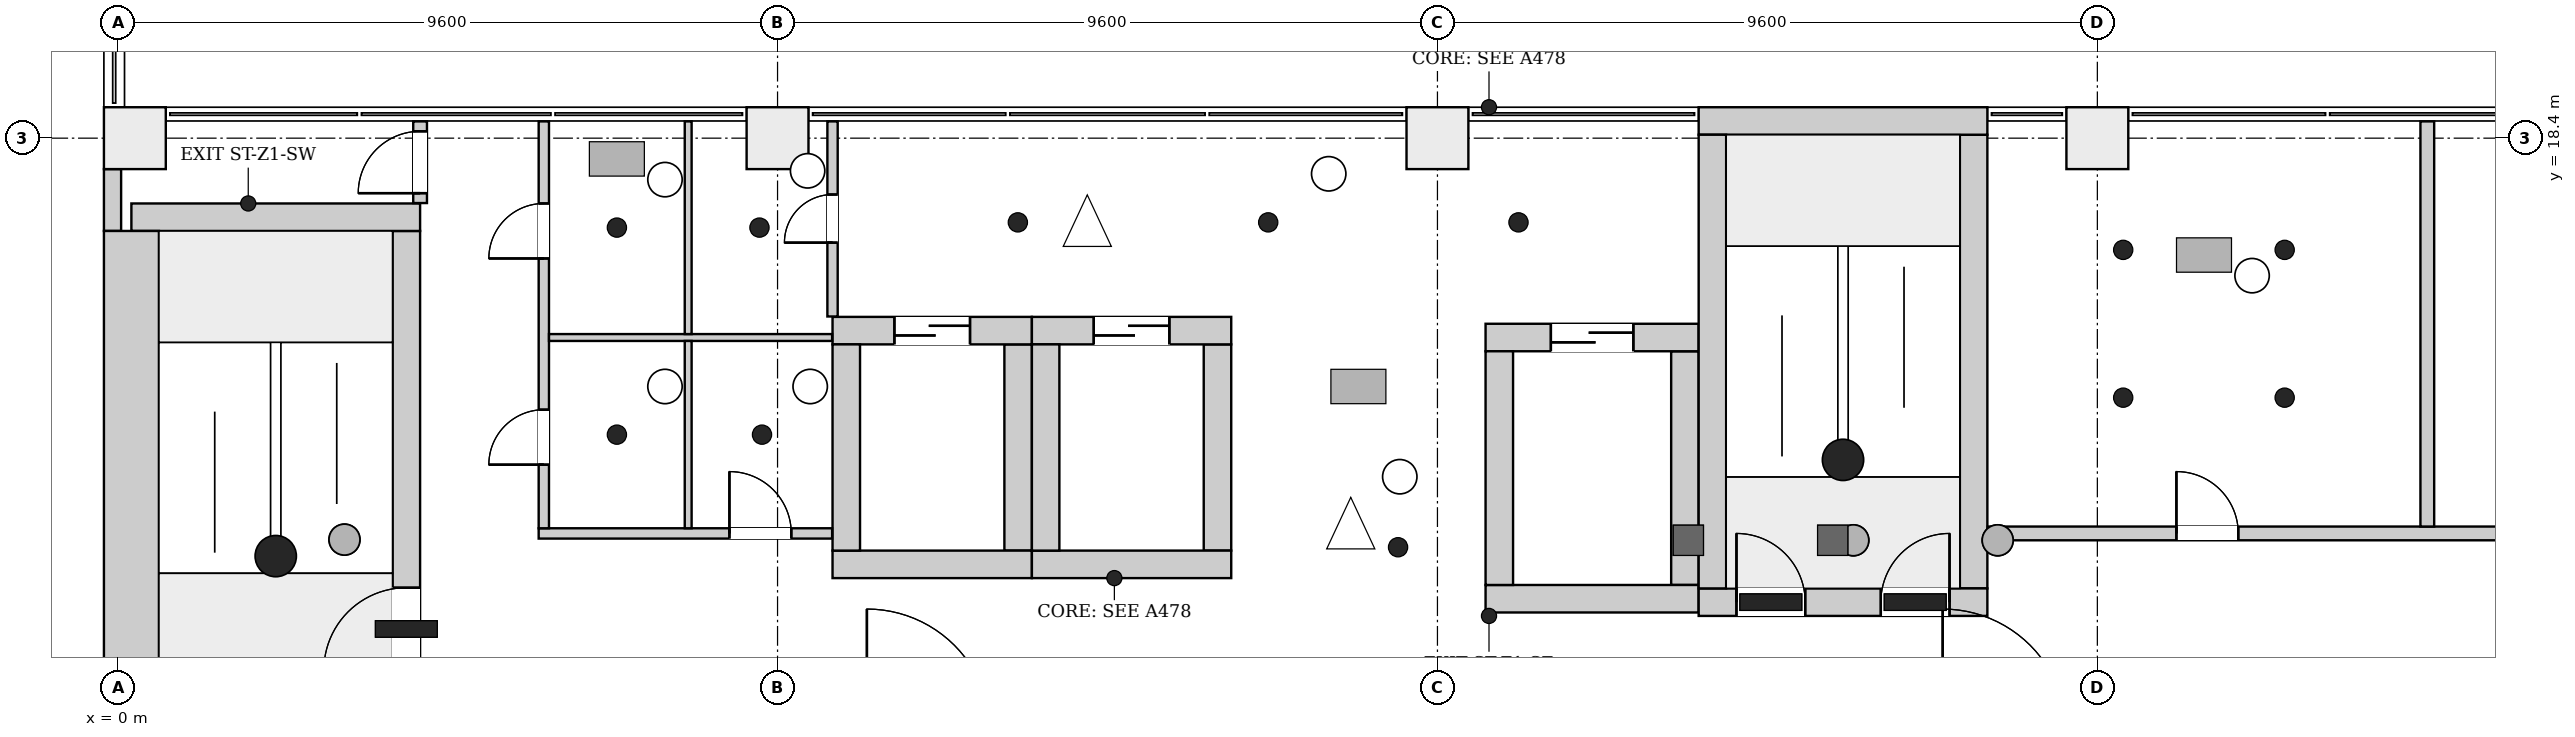
"""IFC4 building model, lengths in metres.
Left out: names, types, materials, properties, quantities, classifications, styles, units other than length and angle.
Written with IfcOpenShell. Run it as: python <this file> out.ifc"""

import sys

from ifc_helpers import new_model, si_unit, direction, frame, frame_2d, origin, origin_2d, place, context, subcontext, project, spatial, rectangle, extrude, element, fill, save


model = new_model("IFC4")
c1 = context("Model", 3, precision=1e-05, world=origin(), true_north=direction((0.0, 1.0)))
c2 = subcontext(c1, "Body", "Model", "MODEL_VIEW")
j1 = project(units=[si_unit("LENGTHUNIT", "METRE"), si_unit("PLANEANGLEUNIT", "RADIAN")], contexts=[c1])
p1 = place(None, origin())
s1 = spatial("IfcSite", under=j1, at=p1, CompositionType="ELEMENT")
p2 = place(p1, origin())
s2 = spatial("IfcBuilding", under=s1, at=p2, CompositionType="ELEMENT")
p3 = place(p2, frame((0.0, 0.0, 57.1)))
s3 = spatial("IfcBuildingStorey", under=s2, at=p3, CompositionType="ELEMENT", Elevation=57.1)
p4 = place(p3, frame((0.2, 17.25, 0.0), z_axis=(0.0, 0.0, 1.0), x_axis=(1.0, 0.0, 0.0)))
e1 = element("IfcWall", 1, at=p4, inside=s3, PredefinedType="SHEAR", context=c2, shape_type="SweptSolid", body=[
    extrude(rectangle(XDim=4.2, YDim=0.4, at=frame_2d((2.1, 0.0))), origin(), (0.0, 0.0, 1.0), 4.2),
])
p5 = place(p3, frame((0.2, 10.45, 0.0), z_axis=(0.0, 0.0, 1.0), x_axis=(0.0, 1.0, 0.0)))
e2 = element("IfcWall", 2, at=p5, inside=s3, PredefinedType="SHEAR", context=c2, shape_type="SweptSolid", body=[
    extrude(rectangle(XDim=6.6, YDim=0.8, at=frame_2d((3.3, 0.0))), origin(), (0.0, 0.0, 1.0), 4.2),
])
p6 = place(p3, frame((4.2, 10.45, 0.0), z_axis=(0.0, 0.0, 1.0), x_axis=(0.0, 1.0, 0.0)))
e3 = element("IfcWall", 3, at=p6, inside=s3, PredefinedType="SHEAR", context=c2, shape_type="SweptSolid", body=[
    extrude(rectangle(XDim=6.6, YDim=0.4, at=frame_2d((3.3, 0.0))), origin(), (0.0, 0.0, 1.0), 4.2),
])
p7 = place(p6, frame((0.21, 0.0, 0.0)))
e4 = element("IfcOpeningElement", 4, at=p7, cuts=e3, PredefinedType="OPENING", context=c2, shape_type="SweptSolid", body=[
    extrude(rectangle(XDim=1.2, YDim=2.1, at=frame_2d((0.6, 1.05))), frame((0.0, 0.21, 0.0), z_axis=(0.0, -1.0, 0.0), x_axis=(1.0, 0.0, 0.0)), (0.0, 0.0, 1.0), 0.42),
])
p8 = place(p3, frame((23.0, 11.65, 0.0), z_axis=(0.0, 0.0, 1.0), x_axis=(1.0, 0.0, 0.0)))
e5 = element("IfcWall", 5, at=p8, inside=s3, PredefinedType="SHEAR", context=c2, shape_type="SweptSolid", body=[
    extrude(rectangle(XDim=4.2, YDim=0.4, at=frame_2d((2.1, 0.0))), origin(), (0.0, 0.0, 1.0), 4.2),
])
p9 = place(p8, frame((0.55, 0.0, 0.0)))
e6 = element("IfcOpeningElement", 6, at=p9, cuts=e5, PredefinedType="OPENING", context=c2, shape_type="SweptSolid", body=[
    extrude(rectangle(XDim=1.0, YDim=2.1, at=frame_2d((0.5, 1.05))), frame((0.0, 0.21, 0.0), z_axis=(0.0, -1.0, 0.0), x_axis=(1.0, 0.0, 0.0)), (0.0, 0.0, 1.0), 0.42),
])
p10 = place(p8, frame((2.65, 0.0, 0.0)))
e7 = element("IfcOpeningElement", 7, at=p10, cuts=e5, PredefinedType="OPENING", context=c2, shape_type="SweptSolid", body=[
    extrude(rectangle(XDim=1.0, YDim=2.1, at=frame_2d((0.5, 1.05))), frame((0.0, 0.21, 0.0), z_axis=(0.0, -1.0, 0.0), x_axis=(1.0, 0.0, 0.0)), (0.0, 0.0, 1.0), 0.42),
])
p11 = place(p3, frame((23.0, 18.65, 0.0), z_axis=(0.0, 0.0, 1.0), x_axis=(1.0, 0.0, 0.0)))
e8 = element("IfcWall", 8, at=p11, inside=s3, PredefinedType="SHEAR", context=c2, shape_type="SweptSolid", body=[
    extrude(rectangle(XDim=4.2, YDim=0.4, at=frame_2d((2.1, 0.0))), origin(), (0.0, 0.0, 1.0), 4.2),
])
for number, where, z_axis, x_axis in (
    (9, (23.2, 11.85, 0.0), (0.0, 0.0, 1.0), (0.0, 1.0, 0.0)),
    (10, (27.0, 11.85, 0.0), (0.0, 0.0, 1.0), (0.0, 1.0, 0.0)),
):
    element("IfcWall", number, at=place(p3, frame(where, z_axis=z_axis, x_axis=x_axis)), inside=s3, PredefinedType="SHEAR", context=c2, shape_type="SweptSolid", body=[
        extrude(rectangle(XDim=6.6, YDim=0.4, at=frame_2d((3.3, 0.0))), origin(), (0.0, 0.0, 1.0), 4.2),
    ])
p12 = place(p3, frame((10.4, 12.2, 0.0), z_axis=(0.0, 0.0, 1.0), x_axis=(1.0, 0.0, 0.0)))
e11 = element("IfcWall", 11, at=p12, inside=s3, PredefinedType="SHEAR", context=c2, shape_type="SweptSolid", body=[
    extrude(rectangle(XDim=2.9, YDim=0.4, at=frame_2d((1.45, 0.0))), origin(), (0.0, 0.0, 1.0), 4.2),
])
p13 = place(p3, frame((10.4, 15.6, 0.0), z_axis=(0.0, 0.0, 1.0), x_axis=(1.0, 0.0, 0.0)))
e12 = element("IfcWall", 12, at=p13, inside=s3, PredefinedType="SHEAR", context=c2, shape_type="SweptSolid", body=[
    extrude(rectangle(XDim=2.9, YDim=0.4, at=frame_2d((1.45, 0.0))), origin(), (0.0, 0.0, 1.0), 4.2),
])
p14 = place(p13, frame((0.9, 0.0, 0.0)))
e13 = element("IfcOpeningElement", 13, at=p14, cuts=e12, PredefinedType="OPENING", context=c2, shape_type="SweptSolid", body=[
    extrude(rectangle(XDim=1.1, YDim=2.1, at=frame_2d((0.55, 1.05))), frame((0.0, 0.21, 0.0), z_axis=(0.0, -1.0, 0.0), x_axis=(1.0, 0.0, 0.0)), (0.0, 0.0, 1.0), 0.42),
])
for number, where, z_axis, x_axis in (
    (14, (10.6, 12.4, 0.0), (0.0, 0.0, 1.0), (0.0, 1.0, 0.0)),
    (15, (13.1, 12.4, 0.0), (0.0, 0.0, 1.0), (0.0, 1.0, 0.0)),
):
    element("IfcWall", number, at=place(p3, frame(where, z_axis=z_axis, x_axis=x_axis)), inside=s3, PredefinedType="SHEAR", context=c2, shape_type="SweptSolid", body=[
        extrude(rectangle(XDim=3.0, YDim=0.4, at=frame_2d((1.5, 0.0))), origin(), (0.0, 0.0, 1.0), 4.2),
    ])
p15 = place(p3, frame((13.3, 12.2, 0.0), z_axis=(0.0, 0.0, 1.0), x_axis=(1.0, 0.0, 0.0)))
e16 = element("IfcWall", 16, at=p15, inside=s3, PredefinedType="SHEAR", context=c2, shape_type="SweptSolid", body=[
    extrude(rectangle(XDim=2.9, YDim=0.4, at=frame_2d((1.45, 0.0))), origin(), (0.0, 0.0, 1.0), 4.2),
])
p16 = place(p3, frame((13.3, 15.6, 0.0), z_axis=(0.0, 0.0, 1.0), x_axis=(1.0, 0.0, 0.0)))
e17 = element("IfcWall", 17, at=p16, inside=s3, PredefinedType="SHEAR", context=c2, shape_type="SweptSolid", body=[
    extrude(rectangle(XDim=2.9, YDim=0.4, at=frame_2d((1.45, 0.0))), origin(), (0.0, 0.0, 1.0), 4.2),
])
p17 = place(p16, frame((0.9, 0.0, 0.0)))
e18 = element("IfcOpeningElement", 18, at=p17, cuts=e17, PredefinedType="OPENING", context=c2, shape_type="SweptSolid", body=[
    extrude(rectangle(XDim=1.1, YDim=2.1, at=frame_2d((0.55, 1.05))), frame((0.0, 0.21, 0.0), z_axis=(0.0, -1.0, 0.0), x_axis=(1.0, 0.0, 0.0)), (0.0, 0.0, 1.0), 0.42),
])
for number, where, z_axis, x_axis in (
    (19, (13.5, 12.4, 0.0), (0.0, 0.0, 1.0), (0.0, 1.0, 0.0)),
    (20, (16.0, 12.4, 0.0), (0.0, 0.0, 1.0), (0.0, 1.0, 0.0)),
):
    element("IfcWall", number, at=place(p3, frame(where, z_axis=z_axis, x_axis=x_axis)), inside=s3, PredefinedType="SHEAR", context=c2, shape_type="SweptSolid", body=[
        extrude(rectangle(XDim=3.0, YDim=0.4, at=frame_2d((1.5, 0.0))), origin(), (0.0, 0.0, 1.0), 4.2),
    ])
p18 = place(p3, frame((19.9, 11.7, 0.0), z_axis=(0.0, 0.0, 1.0), x_axis=(1.0, 0.0, 0.0)))
e21 = element("IfcWall", 21, at=p18, inside=s3, PredefinedType="SHEAR", context=c2, shape_type="SweptSolid", body=[
    extrude(rectangle(XDim=3.1, YDim=0.4, at=frame_2d((1.55, 0.0))), origin(), (0.0, 0.0, 1.0), 4.2),
])
p19 = place(p3, frame((19.9, 15.5, 0.0), z_axis=(0.0, 0.0, 1.0), x_axis=(1.0, 0.0, 0.0)))
e22 = element("IfcWall", 22, at=p19, inside=s3, PredefinedType="SHEAR", context=c2, shape_type="SweptSolid", body=[
    extrude(rectangle(XDim=3.1, YDim=0.4, at=frame_2d((1.55, 0.0))), origin(), (0.0, 0.0, 1.0), 4.2),
])
p20 = place(p19, frame((0.95, 0.0, 0.0)))
e23 = element("IfcOpeningElement", 23, at=p20, cuts=e22, PredefinedType="OPENING", context=c2, shape_type="SweptSolid", body=[
    extrude(rectangle(XDim=1.2, YDim=2.1, at=frame_2d((0.6, 1.05))), frame((0.0, 0.21, 0.0), z_axis=(0.0, -1.0, 0.0), x_axis=(1.0, 0.0, 0.0)), (0.0, 0.0, 1.0), 0.42),
])
for number, where, z_axis, x_axis in (
    (24, (20.1, 11.9, 0.0), (0.0, 0.0, 1.0), (0.0, 1.0, 0.0)),
    (25, (22.8, 11.9, 0.0), (0.0, 0.0, 1.0), (0.0, 1.0, 0.0)),
):
    element("IfcWall", number, at=place(p3, frame(where, z_axis=z_axis, x_axis=x_axis)), inside=s3, PredefinedType="SHEAR", context=c2, shape_type="SweptSolid", body=[
        extrude(rectangle(XDim=3.4, YDim=0.4, at=frame_2d((1.7, 0.0))), origin(), (0.0, 0.0, 1.0), 4.2),
    ])
for number, where, z_axis, x_axis in (
    (26, (0.25, 18.4, 0.0), (0.0, 0.0, 1.0), (1.0, 0.0, 0.0)),
    (27, (9.6, 18.4, 0.0), (0.0, 0.0, 1.0), (1.0, 0.0, 0.0)),
    (28, (19.2, 18.4, 0.0), (0.0, 0.0, 1.0), (1.0, 0.0, 0.0)),
    (29, (28.8, 18.4, 0.0), (0.0, 0.0, 1.0), (1.0, 0.0, 0.0)),
):
    element("IfcColumn", number, at=place(p3, frame(where, z_axis=z_axis, x_axis=x_axis)), inside=s3, PredefinedType="COLUMN", context=c2, shape_type="SweptSolid", body=[
        extrude(rectangle(XDim=0.9, YDim=0.9, at=origin_2d()), origin(), (0.0, 0.0, 1.0), 4.2),
    ])
p21 = place(p3, frame((-0.074, 17.95, 0.0), z_axis=(0.0, 0.0, 1.0), x_axis=(0.0, -1.0, 0.0)))
e30 = element("IfcWall", 30, at=p21, inside=s3, PredefinedType="ELEMENTEDWALL", context=c2, shape_type="SweptSolid", body=[
    extrude(rectangle(XDim=0.9, YDim=0.25, at=frame_2d((0.45, 0.0))), origin(), (0.0, 0.0, 1.0), 3.9),
])
p22 = place(p3, frame((4.4, 17.456, 0.0), z_axis=(0.0, 0.0, 1.0), x_axis=(0.0, 1.0, 0.0)))
e31 = element("IfcWall", 31, at=p22, inside=s3, PredefinedType="PARTITIONING", context=c2, shape_type="SweptSolid", body=[
    extrude(rectangle(XDim=1.188, YDim=0.2, at=frame_2d((0.594, 0.0))), origin(), (0.0, 0.0, 1.0), 3.9),
])
p23 = place(p22, frame((0.144, 0.0, 0.0)))
e32 = element("IfcOpeningElement", 32, at=p23, cuts=e31, PredefinedType="OPENING", context=c2, shape_type="SweptSolid", body=[
    extrude(rectangle(XDim=0.9, YDim=2.1, at=frame_2d((0.45, 1.05))), frame((0.0, 0.11, 0.0), z_axis=(0.0, -1.0, 0.0), x_axis=(1.0, 0.0, 0.0)), (0.0, 0.0, 1.0), 0.22),
])
p24 = place(p3, frame((6.125, 12.65, 0.0), z_axis=(0.0, 0.0, 1.0), x_axis=(1.0, 0.0, 0.0)))
e33 = element("IfcWall", 33, at=p24, inside=s3, PredefinedType="PARTITIONING", context=c2, shape_type="SweptSolid", body=[
    extrude(rectangle(XDim=4.269, YDim=0.15, at=frame_2d((2.135, 0.0))), origin(), (0.0, 0.0, 1.0), 3.9),
])
p25 = place(p24, frame((2.775, 0.0, 0.0)))
e34 = element("IfcOpeningElement", 34, at=p25, cuts=e33, PredefinedType="OPENING", context=c2, shape_type="SweptSolid", body=[
    extrude(rectangle(XDim=0.9, YDim=2.1, at=frame_2d((0.45, 1.05))), frame((0.0, 0.085, 0.0), z_axis=(0.0, -1.0, 0.0), x_axis=(1.0, 0.0, 0.0)), (0.0, 0.0, 1.0), 0.17),
])
p26 = place(p3, frame((6.2, 12.725, 0.0), z_axis=(0.0, 0.0, 1.0), x_axis=(0.0, 1.0, 0.0)))
e35 = element("IfcWall", 35, at=p26, inside=s3, PredefinedType="PARTITIONING", context=c2, shape_type="SweptSolid", body=[
    extrude(rectangle(XDim=5.919, YDim=0.15, at=frame_2d((2.959, 0.0))), origin(), (0.0, 0.0, 1.0), 3.9),
])
p27 = place(p26, frame((0.925, 0.0, 0.0)))
e36 = element("IfcOpeningElement", 36, at=p27, cuts=e35, PredefinedType="OPENING", context=c2, shape_type="SweptSolid", body=[
    extrude(rectangle(XDim=0.8, YDim=2.1, at=frame_2d((0.4, 1.05))), frame((0.0, 0.085, 0.0), z_axis=(0.0, -1.0, 0.0), x_axis=(1.0, 0.0, 0.0)), (0.0, 0.0, 1.0), 0.17),
])
p28 = place(p26, frame((3.925, 0.0, 0.0)))
e37 = element("IfcOpeningElement", 37, at=p28, cuts=e35, PredefinedType="OPENING", context=c2, shape_type="SweptSolid", body=[
    extrude(rectangle(XDim=0.8, YDim=2.1, at=frame_2d((0.4, 1.05))), frame((0.0, 0.085, 0.0), z_axis=(0.0, -1.0, 0.0), x_axis=(1.0, 0.0, 0.0)), (0.0, 0.0, 1.0), 0.17),
])
p29 = place(p3, frame((6.275, 15.5, 0.0), z_axis=(0.0, 0.0, 1.0), x_axis=(1.0, 0.0, 0.0)))
e38 = element("IfcWall", 38, at=p29, inside=s3, PredefinedType="PARTITIONING", context=c2, shape_type="SweptSolid", body=[
    extrude(rectangle(XDim=4.119, YDim=0.1, at=frame_2d((2.06, 0.0))), origin(), (0.0, 0.0, 1.0), 3.9),
])
p30 = place(p3, frame((8.3, 12.725, 0.0), z_axis=(0.0, 0.0, 1.0), x_axis=(0.0, 1.0, 0.0)))
e39 = element("IfcWall", 39, at=p30, inside=s3, PredefinedType="PARTITIONING", context=c2, shape_type="SweptSolid", body=[
    extrude(rectangle(XDim=2.725, YDim=0.1, at=frame_2d((1.362, 0.0))), origin(), (0.0, 0.0, 1.0), 3.9),
])
p31 = place(p3, frame((8.3, 15.55, 0.0), z_axis=(0.0, 0.0, 1.0), x_axis=(0.0, 1.0, 0.0)))
e40 = element("IfcWall", 40, at=p31, inside=s3, PredefinedType="PARTITIONING", context=c2, shape_type="SweptSolid", body=[
    extrude(rectangle(XDim=3.094, YDim=0.1, at=frame_2d((1.547, 0.0))), origin(), (0.0, 0.0, 1.0), 3.9),
])
p32 = place(p3, frame((10.4, 15.806, 0.0), z_axis=(0.0, 0.0, 1.0), x_axis=(0.0, 1.0, 0.0)))
e41 = element("IfcWall", 41, at=p32, inside=s3, PredefinedType="PARTITIONING", context=c2, shape_type="SweptSolid", body=[
    extrude(rectangle(XDim=2.838, YDim=0.15, at=frame_2d((1.419, 0.0))), origin(), (0.0, 0.0, 1.0), 3.9),
])
p33 = place(p32, frame((1.074, 0.0, 0.0)))
e42 = element("IfcOpeningElement", 42, at=p33, cuts=e41, PredefinedType="OPENING", context=c2, shape_type="SweptSolid", body=[
    extrude(rectangle(XDim=0.7, YDim=2.1, at=frame_2d((0.35, 1.05))), frame((0.0, 0.085, 0.0), z_axis=(0.0, -1.0, 0.0), x_axis=(1.0, 0.0, 0.0)), (0.0, 0.0, 1.0), 0.17),
])
p34 = place(p3, frame((27.206, 12.65, 0.0), z_axis=(0.0, 0.0, 1.0), x_axis=(1.0, 0.0, 0.0)))
e43 = element("IfcWall", 43, at=p34, inside=s3, PredefinedType="PARTITIONING", context=c2, shape_type="SweptSolid", body=[
    extrude(rectangle(XDim=20.988, YDim=0.2, at=frame_2d((10.494, 0.0))), origin(), (0.0, 0.0, 1.0), 3.9),
])
p35 = place(p34, frame((2.744, 0.0, 0.0)))
e44 = element("IfcOpeningElement", 44, at=p35, cuts=e43, PredefinedType="OPENING", context=c2, shape_type="SweptSolid", body=[
    extrude(rectangle(XDim=0.9, YDim=2.1, at=frame_2d((0.45, 1.05))), frame((0.0, 0.11, 0.0), z_axis=(0.0, -1.0, 0.0), x_axis=(1.0, 0.0, 0.0)), (0.0, 0.0, 1.0), 0.22),
])
p36 = place(p34, frame((13.094, 0.0, 0.0)))
e45 = element("IfcOpeningElement", 45, at=p36, cuts=e43, PredefinedType="OPENING", context=c2, shape_type="SweptSolid", body=[
    extrude(rectangle(XDim=1.2, YDim=2.1, at=frame_2d((0.6, 1.05))), frame((0.0, 0.11, 0.0), z_axis=(0.0, -1.0, 0.0), x_axis=(1.0, 0.0, 0.0)), (0.0, 0.0, 1.0), 0.22),
])
p37 = place(p3, frame((33.6, 12.75, 0.0), z_axis=(0.0, 0.0, 1.0), x_axis=(0.0, 1.0, 0.0)))
e46 = element("IfcWall", 46, at=p37, inside=s3, PredefinedType="PARTITIONING", context=c2, shape_type="SweptSolid", body=[
    extrude(rectangle(XDim=5.894, YDim=0.2, at=frame_2d((2.947, 0.0))), origin(), (0.0, 0.0, 1.0), 3.9),
])
p38 = place(p7, origin())
e47 = element("IfcDoor", 47, at=p38, inside=s3, OperationType="SINGLE_SWING_RIGHT", PredefinedType="DOOR", context=c2, shape_type="SweptSolid", body=[
    extrude(rectangle(XDim=1.2, YDim=2.1, at=frame_2d((0.6, 1.05))), frame((0.0, 0.025, 0.0), z_axis=(0.0, -1.0, 0.0), x_axis=(1.0, 0.0, 0.0)), (0.0, 0.0, 1.0), 0.05),
])
fill(e4, e47)
p39 = place(p9, origin())
e48 = element("IfcDoor", 48, at=p39, inside=s3, OperationType="SINGLE_SWING_RIGHT", PredefinedType="DOOR", context=c2, shape_type="SweptSolid", body=[
    extrude(rectangle(XDim=1.0, YDim=2.1, at=frame_2d((0.5, 1.05))), frame((0.0, 0.025, 0.0), z_axis=(0.0, -1.0, 0.0), x_axis=(1.0, 0.0, 0.0)), (0.0, 0.0, 1.0), 0.05),
])
fill(e6, e48)
p40 = place(p10, origin())
e49 = element("IfcDoor", 49, at=p40, inside=s3, OperationType="SINGLE_SWING_LEFT", PredefinedType="DOOR", context=c2, shape_type="SweptSolid", body=[
    extrude(rectangle(XDim=1.0, YDim=2.1, at=frame_2d((0.5, 1.05))), frame((0.0, 0.025, 0.0), z_axis=(0.0, -1.0, 0.0), x_axis=(1.0, 0.0, 0.0)), (0.0, 0.0, 1.0), 0.05),
])
fill(e7, e49)
p41 = place(p14, origin())
e50 = element("IfcDoor", 50, at=p41, inside=s3, OperationType="DOUBLE_DOOR_SLIDING", PredefinedType="DOOR", context=c2, shape_type="SweptSolid", body=[
    extrude(rectangle(XDim=1.1, YDim=2.1, at=frame_2d((0.55, 1.05))), frame((0.0, 0.025, 0.0), z_axis=(0.0, -1.0, 0.0), x_axis=(1.0, 0.0, 0.0)), (0.0, 0.0, 1.0), 0.05),
])
fill(e13, e50)
p42 = place(p17, origin())
e51 = element("IfcDoor", 51, at=p42, inside=s3, OperationType="DOUBLE_DOOR_SLIDING", PredefinedType="DOOR", context=c2, shape_type="SweptSolid", body=[
    extrude(rectangle(XDim=1.1, YDim=2.1, at=frame_2d((0.55, 1.05))), frame((0.0, 0.025, 0.0), z_axis=(0.0, -1.0, 0.0), x_axis=(1.0, 0.0, 0.0)), (0.0, 0.0, 1.0), 0.05),
])
fill(e18, e51)
p43 = place(p20, origin())
e52 = element("IfcDoor", 52, at=p43, inside=s3, OperationType="DOUBLE_DOOR_SLIDING", PredefinedType="DOOR", context=c2, shape_type="SweptSolid", body=[
    extrude(rectangle(XDim=1.2, YDim=2.1, at=frame_2d((0.6, 1.05))), frame((0.0, 0.025, 0.0), z_axis=(0.0, -1.0, 0.0), x_axis=(1.0, 0.0, 0.0)), (0.0, 0.0, 1.0), 0.05),
])
fill(e23, e52)
p44 = place(p23, origin())
e53 = element("IfcDoor", 53, at=p44, inside=s3, OperationType="SINGLE_SWING_LEFT", PredefinedType="DOOR", context=c2, shape_type="SweptSolid", body=[
    extrude(rectangle(XDim=0.9, YDim=2.1, at=frame_2d((0.45, 1.05))), frame((0.0, 0.025, 0.0), z_axis=(0.0, -1.0, 0.0), x_axis=(1.0, 0.0, 0.0)), (0.0, 0.0, 1.0), 0.05),
])
fill(e32, e53)
p45 = place(p27, origin())
e54 = element("IfcDoor", 54, at=p45, inside=s3, OperationType="SINGLE_SWING_LEFT", PredefinedType="DOOR", context=c2, shape_type="SweptSolid", body=[
    extrude(rectangle(XDim=0.8, YDim=2.1, at=frame_2d((0.4, 1.05))), frame((0.0, 0.025, 0.0), z_axis=(0.0, -1.0, 0.0), x_axis=(1.0, 0.0, 0.0)), (0.0, 0.0, 1.0), 0.05),
])
fill(e36, e54)
p46 = place(p25, origin())
e55 = element("IfcDoor", 55, at=p46, inside=s3, OperationType="SINGLE_SWING_RIGHT", PredefinedType="DOOR", context=c2, shape_type="SweptSolid", body=[
    extrude(rectangle(XDim=0.9, YDim=2.1, at=frame_2d((0.45, 1.05))), frame((0.0, 0.025, 0.0), z_axis=(0.0, -1.0, 0.0), x_axis=(1.0, 0.0, 0.0)), (0.0, 0.0, 1.0), 0.05),
])
fill(e34, e55)
p47 = place(p28, origin())
e56 = element("IfcDoor", 56, at=p47, inside=s3, OperationType="SINGLE_SWING_LEFT", PredefinedType="DOOR", context=c2, shape_type="SweptSolid", body=[
    extrude(rectangle(XDim=0.8, YDim=2.1, at=frame_2d((0.4, 1.05))), frame((0.0, 0.025, 0.0), z_axis=(0.0, -1.0, 0.0), x_axis=(1.0, 0.0, 0.0)), (0.0, 0.0, 1.0), 0.05),
])
fill(e37, e56)
p48 = place(p33, origin())
e57 = element("IfcDoor", 57, at=p48, inside=s3, OperationType="SINGLE_SWING_LEFT", PredefinedType="DOOR", context=c2, shape_type="SweptSolid", body=[
    extrude(rectangle(XDim=0.7, YDim=2.1, at=frame_2d((0.35, 1.05))), frame((0.0, 0.025, 0.0), z_axis=(0.0, -1.0, 0.0), x_axis=(1.0, 0.0, 0.0)), (0.0, 0.0, 1.0), 0.05),
])
fill(e42, e57)
p49 = place(p35, origin())
e58 = element("IfcDoor", 58, at=p49, inside=s3, OperationType="SINGLE_SWING_LEFT", PredefinedType="DOOR", context=c2, shape_type="SweptSolid", body=[
    extrude(rectangle(XDim=0.9, YDim=2.1, at=frame_2d((0.45, 1.05))), frame((0.0, 0.025, 0.0), z_axis=(0.0, -1.0, 0.0), x_axis=(1.0, 0.0, 0.0)), (0.0, 0.0, 1.0), 0.05),
])
fill(e44, e58)
save(model, sys.argv[1])
